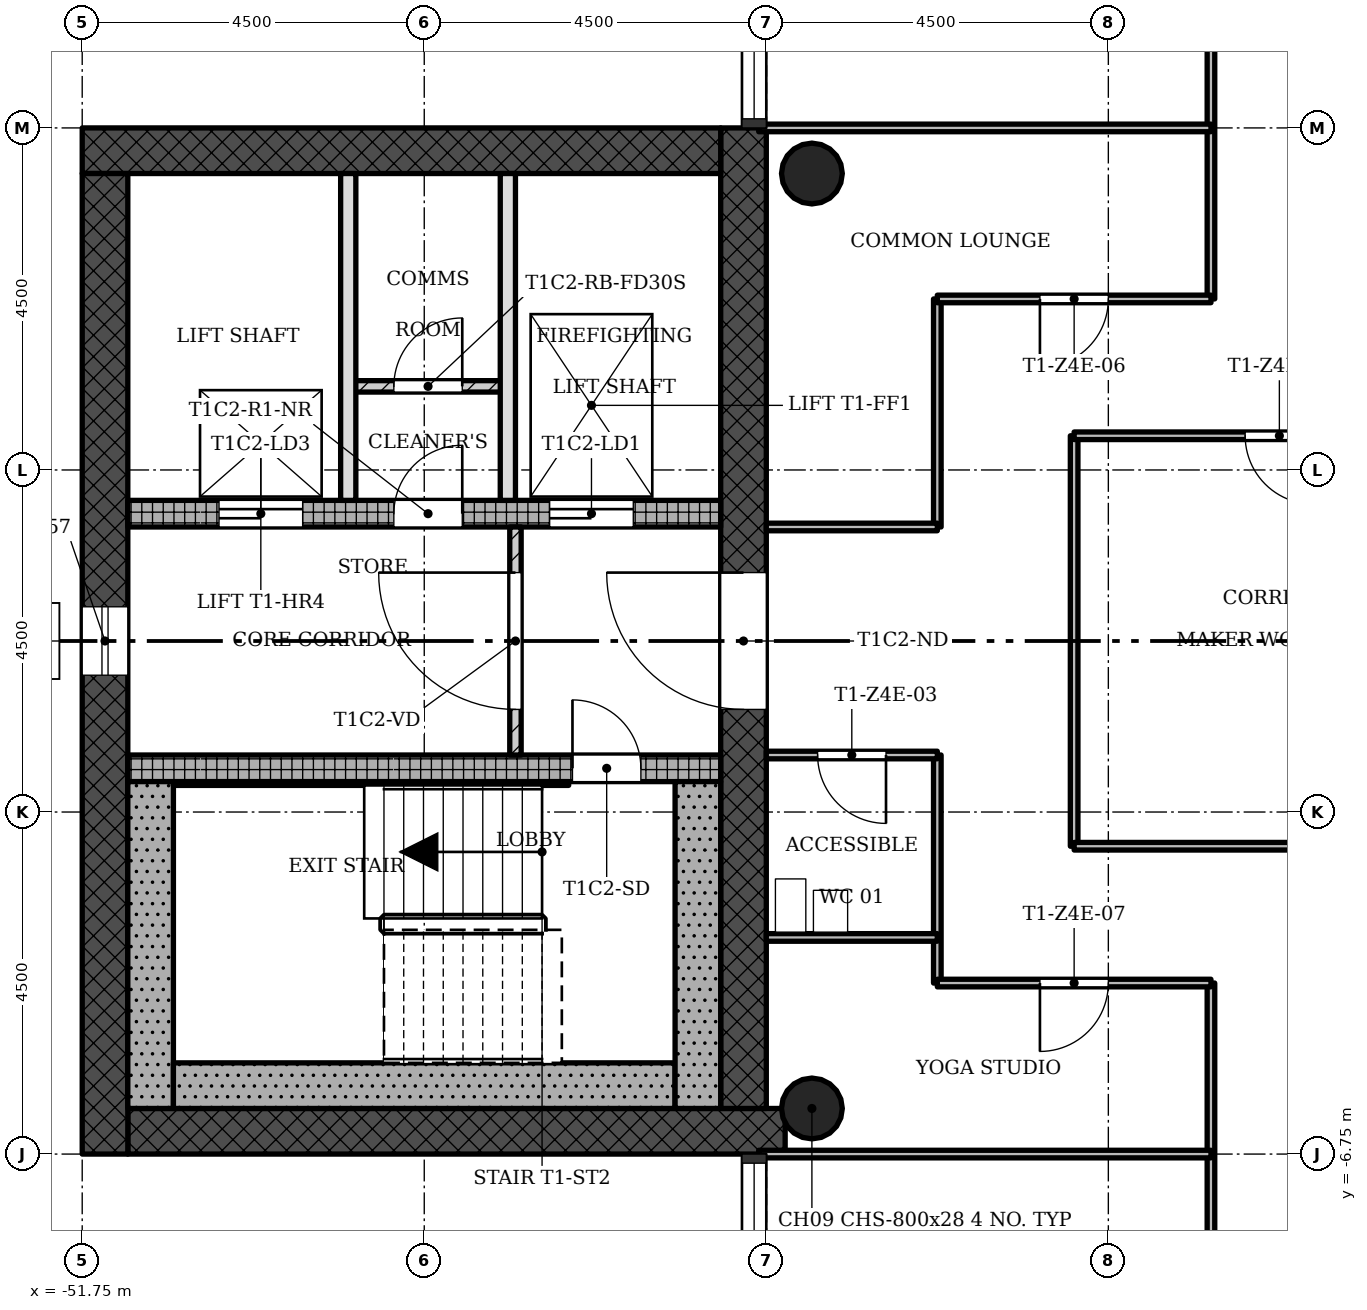
"""IFC4 building model, lengths in metres.
Left out: names, types, materials, properties, quantities, classifications, styles, units other than length and angle.
Written with IfcOpenShell. Run it as: python <this file> out.ifc"""

import sys

from ifc_helpers import new_model, si_unit, direction, frame, frame_2d, origin, origin_2d, place, context, subcontext, project, spatial, rectangle, hollow_circle, extrude, element, fill, save


model = new_model("IFC4")
c1 = context("Model", 3, precision=1e-05, world=origin(), true_north=direction((0.0, 1.0)))
c2 = subcontext(c1, "Body", "Model", "MODEL_VIEW")
j1 = project(units=[si_unit("LENGTHUNIT", "METRE"), si_unit("PLANEANGLEUNIT", "RADIAN")], contexts=[c1])
p1 = place(None, origin())
s1 = spatial("IfcSite", under=j1, at=p1, CompositionType="ELEMENT")
p2 = place(p1, origin())
s2 = spatial("IfcBuilding", under=s1, at=p2, CompositionType="ELEMENT")
p3 = place(p2, frame((0.0, 0.0, 206.2)))
s3 = spatial("IfcBuildingStorey", under=s2, at=p3, CompositionType="ELEMENT", Elevation=206.2)
p4 = place(p3, frame((-51.15, -6.45, 0.0), z_axis=(0.0, 0.0, 1.0), x_axis=(1.0, 0.0, 0.0)))
e1 = element("IfcWall", 1, at=p4, inside=s3, PredefinedType="SHEAR", context=c2, shape_type="SweptSolid", body=[
    extrude(rectangle(XDim=8.648, YDim=0.6, at=frame_2d((4.324, 0.0))), origin(), (0.0, 0.0, 1.0), 3.4),
])
p5 = place(p3, frame((-43.05, -6.15, 0.0), z_axis=(0.0, 0.0, 1.0), x_axis=(0.0, 1.0, 0.0)))
e2 = element("IfcWall", 2, at=p5, inside=s3, PredefinedType="SHEAR", context=c2, shape_type="SweptSolid", body=[
    extrude(rectangle(XDim=12.9, YDim=0.6, at=frame_2d((6.45, 0.0))), origin(), (0.0, 0.0, 1.0), 3.4),
])
p6 = place(p5, frame((5.25, 0.0, 0.0)))
e3 = element("IfcOpeningElement", 3, at=p6, cuts=e2, PredefinedType="OPENING", context=c2, shape_type="SweptSolid", body=[
    extrude(rectangle(XDim=1.8, YDim=2.1, at=frame_2d((0.9, 1.05))), frame((0.0, 0.31, 0.0), z_axis=(0.0, -1.0, 0.0), x_axis=(1.0, 0.0, 0.0)), (0.0, 0.0, 1.0), 0.62),
])
p7 = place(p3, frame((-43.35, 6.45, 0.0), z_axis=(0.0, 0.0, 1.0), x_axis=(-1.0, 0.0, 0.0)))
e4 = element("IfcWall", 4, at=p7, inside=s3, PredefinedType="SHEAR", context=c2, shape_type="SweptSolid", body=[
    extrude(rectangle(XDim=8.4, YDim=0.6, at=frame_2d((4.2, 0.0))), origin(), (0.0, 0.0, 1.0), 3.4),
])
p8 = place(p3, frame((-51.45, 6.15, 0.0), z_axis=(0.0, 0.0, 1.0), x_axis=(0.0, -1.0, 0.0)))
e5 = element("IfcWall", 5, at=p8, inside=s3, PredefinedType="SHEAR", context=c2, shape_type="SweptSolid", body=[
    extrude(rectangle(XDim=12.9, YDim=0.6, at=frame_2d((6.45, 0.0))), origin(), (0.0, 0.0, 1.0), 3.4),
])
p9 = place(p8, frame((5.7, 0.0, 0.45)))
e6 = element("IfcOpeningElement", 6, at=p9, cuts=e5, PredefinedType="OPENING", context=c2, shape_type="SweptSolid", body=[
    extrude(rectangle(XDim=0.9, YDim=2.4, at=frame_2d((0.45, 1.2))), frame((0.0, 0.31, 0.0), z_axis=(0.0, -1.0, 0.0), x_axis=(1.0, 0.0, 0.0)), (0.0, 0.0, 1.0), 0.62),
])
p10 = place(p3, frame((-51.15, -1.675, 0.0), z_axis=(0.0, 0.0, 1.0), x_axis=(1.0, 0.0, 0.0)))
e7 = element("IfcWall", 7, at=p10, inside=s3, PredefinedType="SHEAR", context=c2, shape_type="SweptSolid", body=[
    extrude(rectangle(XDim=7.8, YDim=0.35, at=frame_2d((3.9, 0.0))), origin(), (0.0, 0.0, 1.0), 3.4),
])
p11 = place(p10, frame((5.85, 0.0, 0.0)))
e8 = element("IfcOpeningElement", 8, at=p11, cuts=e7, PredefinedType="OPENING", context=c2, shape_type="SweptSolid", body=[
    extrude(rectangle(XDim=0.9, YDim=2.1, at=frame_2d((0.45, 1.05))), frame((0.0, 0.185, 0.0), z_axis=(0.0, -1.0, 0.0), x_axis=(1.0, 0.0, 0.0)), (0.0, 0.0, 1.0), 0.37),
])
p12 = place(p3, frame((-51.15, 1.675, 0.0), z_axis=(0.0, 0.0, 1.0), x_axis=(1.0, 0.0, 0.0)))
e9 = element("IfcWall", 9, at=p12, inside=s3, PredefinedType="SHEAR", context=c2, shape_type="SweptSolid", body=[
    extrude(rectangle(XDim=7.8, YDim=0.35, at=frame_2d((3.9, 0.0))), origin(), (0.0, 0.0, 1.0), 3.4),
])
p13 = place(p12, frame((5.55, 0.0, 0.0)))
e10 = element("IfcOpeningElement", 10, at=p13, cuts=e9, PredefinedType="OPENING", context=c2, shape_type="SweptSolid", body=[
    extrude(rectangle(XDim=1.1, YDim=2.1, at=frame_2d((0.55, 1.05))), frame((0.0, 0.185, 0.0), z_axis=(0.0, -1.0, 0.0), x_axis=(1.0, 0.0, 0.0)), (0.0, 0.0, 1.0), 0.37),
])
p14 = place(p12, frame((1.2, 0.0, 0.0)))
e11 = element("IfcOpeningElement", 11, at=p14, cuts=e9, PredefinedType="OPENING", context=c2, shape_type="SweptSolid", body=[
    extrude(rectangle(XDim=1.1, YDim=2.1, at=frame_2d((0.55, 1.05))), frame((0.0, 0.185, 0.0), z_axis=(0.0, -1.0, 0.0), x_axis=(1.0, 0.0, 0.0)), (0.0, 0.0, 1.0), 0.37),
])
p15 = place(p12, frame((3.5, 0.0, 0.0)))
e12 = element("IfcOpeningElement", 12, at=p15, cuts=e9, PredefinedType="OPENING", context=c2, shape_type="SweptSolid", body=[
    extrude(rectangle(XDim=0.9, YDim=2.1, at=frame_2d((0.45, 1.05))), frame((0.0, 0.185, 0.0), z_axis=(0.0, -1.0, 0.0), x_axis=(1.0, 0.0, 0.0)), (0.0, 0.0, 1.0), 0.37),
])
for number, where, z_axis, x_axis in (
    (13, (-42.15, -6.15, 0.0), (0.0, 0.0, 1.0), (1.0, 0.0, 0.0)),
    (14, (-42.15, 6.15, 0.0), (0.0, 0.0, 1.0), (1.0, 0.0, 0.0)),
):
    element("IfcColumn", number, at=place(p3, frame(where, z_axis=z_axis, x_axis=x_axis)), inside=s3, PredefinedType="COLUMN", context=c2, shape_type="SweptSolid", body=[
        extrude(hollow_circle(Radius=0.4, WallThickness=0.028, at=origin_2d()), origin(), (0.0, 0.0, 1.0), 3.4),
    ])
p16 = place(p3, frame((-46.05, 1.5, 0.0), z_axis=(0.0, 0.0, 1.0), x_axis=(0.0, -1.0, 0.0)))
e15 = element("IfcWall", 15, at=p16, inside=s3, PredefinedType="PARTITIONING", context=c2, shape_type="SweptSolid", body=[
    extrude(rectangle(XDim=3.0, YDim=0.15, at=frame_2d((1.5, 0.0))), origin(), (0.0, 0.0, 1.0), 3.0),
])
p17 = place(p16, frame((0.6, 0.0, 0.0)))
e16 = element("IfcOpeningElement", 16, at=p17, cuts=e15, PredefinedType="OPENING", context=c2, shape_type="SweptSolid", body=[
    extrude(rectangle(XDim=1.8, YDim=2.1, at=frame_2d((0.9, 1.05))), frame((0.0, 0.085, 0.0), z_axis=(0.0, -1.0, 0.0), x_axis=(1.0, 0.0, 0.0)), (0.0, 0.0, 1.0), 0.17),
])
for number, where, z_axis, x_axis in (
    (17, (-48.25, 6.15, 0.0), (0.0, 0.0, 1.0), (0.0, -1.0, 0.0)),
    (18, (-46.15, 6.15, 0.0), (0.0, 0.0, 1.0), (0.0, -1.0, 0.0)),
):
    element("IfcWall", number, at=place(p3, frame(where, z_axis=z_axis, x_axis=x_axis)), inside=s3, PredefinedType="SOLIDWALL", context=c2, shape_type="SweptSolid", body=[
        extrude(rectangle(XDim=4.3, YDim=0.2, at=frame_2d((2.15, 0.0))), origin(), (0.0, 0.0, 1.0), 3.0),
    ])
p18 = place(p3, frame((-46.15, 3.35, 0.0), z_axis=(0.0, 0.0, 1.0), x_axis=(-1.0, 0.0, 0.0)))
e19 = element("IfcWall", 19, at=p18, inside=s3, PredefinedType="PARTITIONING", context=c2, shape_type="SweptSolid", body=[
    extrude(rectangle(XDim=2.1, YDim=0.15, at=frame_2d((1.05, 0.0))), origin(), (0.0, 0.0, 1.0), 3.0),
])
p19 = place(p18, frame((0.6, 0.0, 0.0)))
e20 = element("IfcOpeningElement", 20, at=p19, cuts=e19, PredefinedType="OPENING", context=c2, shape_type="SweptSolid", body=[
    extrude(rectangle(XDim=0.9, YDim=2.1, at=frame_2d((0.45, 1.05))), frame((0.0, 0.085, 0.0), z_axis=(0.0, -1.0, 0.0), x_axis=(1.0, 0.0, 0.0)), (0.0, 0.0, 1.0), 0.17),
])
for number, where, z_axis, x_axis in (
    (21, (-40.5, -4.5, 0.0), (0.0, 0.0, 1.0), (0.0, 1.0, 0.0)),
    (22, (-40.5, 1.5, 0.0), (0.0, 0.0, 1.0), (0.0, 1.0, 0.0)),
):
    element("IfcWall", number, at=place(p3, frame(where, z_axis=z_axis, x_axis=x_axis)), inside=s3, PredefinedType="PARTITIONING", context=c2, shape_type="SweptSolid", body=[
        extrude(rectangle(XDim=3.0, YDim=0.1, at=frame_2d((1.5, 0.0))), origin(), (0.0, 0.0, 1.0), 3.0),
    ])
p20 = place(p3, frame((-38.7, -2.7, 0.0), z_axis=(0.0, 0.0, 1.0), x_axis=(0.0, 1.0, 0.0)))
e23 = element("IfcWall", 23, at=p20, inside=s3, PredefinedType="PARTITIONING", context=c2, shape_type="SweptSolid", body=[
    extrude(rectangle(XDim=5.4, YDim=0.1, at=frame_2d((2.7, 0.0))), origin(), (0.0, 0.0, 1.0), 3.0),
])
p21 = place(p3, frame((-36.9, -8.55, 0.0), z_axis=(0.0, 0.0, 1.0), x_axis=(0.0, 1.0, 0.0)))
e24 = element("IfcWall", 24, at=p21, inside=s3, PredefinedType="PARTITIONING", context=c2, shape_type="SweptSolid", body=[
    extrude(rectangle(XDim=4.05, YDim=0.1, at=frame_2d((2.025, 0.0))), origin(), (0.0, 0.0, 1.0), 3.0),
])
p22 = place(p3, frame((-36.9, 4.5, 0.0), z_axis=(0.0, 0.0, 1.0), x_axis=(0.0, 1.0, 0.0)))
e25 = element("IfcWall", 25, at=p22, inside=s3, PredefinedType="PARTITIONING", context=c2, shape_type="SweptSolid", body=[
    extrude(rectangle(XDim=6.75, YDim=0.1, at=frame_2d((3.375, 0.0))), origin(), (0.0, 0.0, 1.0), 3.0),
])
p23 = place(p22, frame((4.05, 0.0, 0.0)))
e26 = element("IfcOpeningElement", 26, at=p23, cuts=e25, PredefinedType="OPENING", context=c2, shape_type="SweptSolid", body=[
    extrude(rectangle(XDim=0.9, YDim=2.1, at=frame_2d((0.45, 1.05))), frame((0.0, 0.06, 0.0), z_axis=(0.0, -1.0, 0.0), x_axis=(1.0, 0.0, 0.0)), (0.0, 0.0, 1.0), 0.12),
])
p24 = place(p3, frame((-42.85, -6.75, 0.0), z_axis=(0.0, 0.0, 1.0), x_axis=(1.0, 0.0, 0.0)))
e27 = element("IfcWall", 27, at=p24, inside=s3, PredefinedType="PARTITIONING", context=c2, shape_type="SweptSolid", body=[
    extrude(rectangle(XDim=5.95, YDim=0.1, at=frame_2d((2.975, 0.0))), origin(), (0.0, 0.0, 1.0), 3.0),
])
p25 = place(p3, frame((-40.5, -4.5, 0.0), z_axis=(0.0, 0.0, 1.0), x_axis=(1.0, 0.0, 0.0)))
e28 = element("IfcWall", 28, at=p25, inside=s3, PredefinedType="PARTITIONING", context=c2, shape_type="SweptSolid", body=[
    extrude(rectangle(XDim=3.6, YDim=0.1, at=frame_2d((1.8, 0.0))), origin(), (0.0, 0.0, 1.0), 3.0),
])
p26 = place(p25, frame((1.35, 0.0, 0.0)))
e29 = element("IfcOpeningElement", 29, at=p26, cuts=e28, PredefinedType="OPENING", context=c2, shape_type="SweptSolid", body=[
    extrude(rectangle(XDim=0.9, YDim=2.1, at=frame_2d((0.45, 1.05))), frame((0.0, 0.06, 0.0), z_axis=(0.0, -1.0, 0.0), x_axis=(1.0, 0.0, 0.0)), (0.0, 0.0, 1.0), 0.12),
])
p27 = place(p3, frame((-42.75, -3.9, 0.0), z_axis=(0.0, 0.0, 1.0), x_axis=(1.0, 0.0, 0.0)))
e30 = element("IfcWall", 30, at=p27, inside=s3, PredefinedType="PARTITIONING", context=c2, shape_type="SweptSolid", body=[
    extrude(rectangle(XDim=2.25, YDim=0.1, at=frame_2d((1.125, 0.0))), origin(), (0.0, 0.0, 1.0), 3.0),
])
p28 = place(p3, frame((-38.7, -2.7, 0.0), z_axis=(0.0, 0.0, 1.0), x_axis=(1.0, 0.0, 0.0)))
e31 = element("IfcWall", 31, at=p28, inside=s3, PredefinedType="PARTITIONING", context=c2, shape_type="SweptSolid", body=[
    extrude(rectangle(XDim=5.4, YDim=0.1, at=frame_2d((2.7, 0.0))), origin(), (0.0, 0.0, 1.0), 3.0),
])
p29 = place(p3, frame((-42.75, -1.5, 0.0), z_axis=(0.0, 0.0, 1.0), x_axis=(1.0, 0.0, 0.0)))
e32 = element("IfcWall", 32, at=p29, inside=s3, PredefinedType="PARTITIONING", context=c2, shape_type="SweptSolid", body=[
    extrude(rectangle(XDim=2.25, YDim=0.1, at=frame_2d((1.125, 0.0))), origin(), (0.0, 0.0, 1.0), 3.0),
])
p30 = place(p29, frame((0.675, 0.0, 0.0)))
e33 = element("IfcOpeningElement", 33, at=p30, cuts=e32, PredefinedType="OPENING", context=c2, shape_type="SweptSolid", body=[
    extrude(rectangle(XDim=0.9, YDim=2.1, at=frame_2d((0.45, 1.05))), frame((0.0, 0.06, 0.0), z_axis=(0.0, -1.0, 0.0), x_axis=(1.0, 0.0, 0.0)), (0.0, 0.0, 1.0), 0.12),
])
p31 = place(p3, frame((-42.75, 1.5, 0.0), z_axis=(0.0, 0.0, 1.0), x_axis=(1.0, 0.0, 0.0)))
e34 = element("IfcWall", 34, at=p31, inside=s3, PredefinedType="PARTITIONING", context=c2, shape_type="SweptSolid", body=[
    extrude(rectangle(XDim=2.25, YDim=0.1, at=frame_2d((1.125, 0.0))), origin(), (0.0, 0.0, 1.0), 3.0),
])
p32 = place(p3, frame((-38.7, 2.7, 0.0), z_axis=(0.0, 0.0, 1.0), x_axis=(1.0, 0.0, 0.0)))
e35 = element("IfcWall", 35, at=p32, inside=s3, PredefinedType="PARTITIONING", context=c2, shape_type="SweptSolid", body=[
    extrude(rectangle(XDim=5.4, YDim=0.1, at=frame_2d((2.7, 0.0))), origin(), (0.0, 0.0, 1.0), 3.0),
])
p33 = place(p32, frame((2.25, 0.0, 0.0)))
e36 = element("IfcOpeningElement", 36, at=p33, cuts=e35, PredefinedType="OPENING", context=c2, shape_type="SweptSolid", body=[
    extrude(rectangle(XDim=0.9, YDim=2.1, at=frame_2d((0.45, 1.05))), frame((0.0, 0.06, 0.0), z_axis=(0.0, -1.0, 0.0), x_axis=(1.0, 0.0, 0.0)), (0.0, 0.0, 1.0), 0.12),
])
p34 = place(p3, frame((-40.5, 4.5, 0.0), z_axis=(0.0, 0.0, 1.0), x_axis=(1.0, 0.0, 0.0)))
e37 = element("IfcWall", 37, at=p34, inside=s3, PredefinedType="PARTITIONING", context=c2, shape_type="SweptSolid", body=[
    extrude(rectangle(XDim=3.6, YDim=0.1, at=frame_2d((1.8, 0.0))), origin(), (0.0, 0.0, 1.0), 3.0),
])
p35 = place(p34, frame((1.35, 0.0, 0.0)))
e38 = element("IfcOpeningElement", 38, at=p35, cuts=e37, PredefinedType="OPENING", context=c2, shape_type="SweptSolid", body=[
    extrude(rectangle(XDim=0.9, YDim=2.1, at=frame_2d((0.45, 1.05))), frame((0.0, 0.06, 0.0), z_axis=(0.0, -1.0, 0.0), x_axis=(1.0, 0.0, 0.0)), (0.0, 0.0, 1.0), 0.12),
])
p36 = place(p3, frame((-42.85, 6.75, 0.0), z_axis=(0.0, 0.0, 1.0), x_axis=(1.0, 0.0, 0.0)))
e39 = element("IfcWall", 39, at=p36, inside=s3, PredefinedType="PARTITIONING", context=c2, shape_type="SweptSolid", body=[
    extrude(rectangle(XDim=5.95, YDim=0.1, at=frame_2d((2.975, 0.0))), origin(), (0.0, 0.0, 1.0), 3.0),
])
p37 = place(p3, frame((-50.85, -1.85, 0.0), z_axis=(0.0, 0.0, 1.0), x_axis=(0.0, -1.0, 0.0)))
e40 = element("IfcWall", 40, at=p37, inside=s3, PredefinedType="SHEAR", context=c2, shape_type="SweptSolid", body=[
    extrude(rectangle(XDim=4.3, YDim=0.6, at=frame_2d((2.15, 0.0))), origin(), (0.0, 0.0, 1.0), 3.4),
])
p38 = place(p3, frame((-43.95, -5.85, 0.0), z_axis=(0.0, 0.0, 1.0), x_axis=(-1.0, 0.0, 0.0)))
e41 = element("IfcWall", 41, at=p38, inside=s3, PredefinedType="SHEAR", context=c2, shape_type="SweptSolid", body=[
    extrude(rectangle(XDim=6.6, YDim=0.6, at=frame_2d((3.3, 0.0))), origin(), (0.0, 0.0, 1.0), 3.4),
])
p39 = place(p3, frame((-43.65, -1.85, 0.0), z_axis=(0.0, 0.0, 1.0), x_axis=(0.0, -1.0, 0.0)))
e42 = element("IfcWall", 42, at=p39, inside=s3, PredefinedType="SHEAR", context=c2, shape_type="SweptSolid", body=[
    extrude(rectangle(XDim=4.3, YDim=0.6, at=frame_2d((2.15, 0.0))), origin(), (0.0, 0.0, 1.0), 3.4),
])
p40 = place(p3, frame((-45.35, -1.875, 0.0), z_axis=(0.0, 0.0, 1.0), x_axis=(-1.0, 0.0, 0.0)))
e43 = element("IfcWall", 43, at=p40, inside=s3, PredefinedType="SHEAR", context=c2, shape_type="SweptSolid", body=[
    extrude(rectangle(XDim=5.2, YDim=0.05, at=frame_2d((2.6, 0.0))), origin(), (0.0, 0.0, 1.0), 3.4),
])
p41 = place(p9, origin())
e44 = element("IfcWindow", 44, at=p41, inside=s3, PartitioningType="SINGLE_PANEL", PredefinedType="WINDOW", context=c2, shape_type="SweptSolid", body=[
    extrude(rectangle(XDim=0.9, YDim=2.4, at=frame_2d((0.45, 1.2))), frame((0.0, 0.03, 0.0), z_axis=(0.0, -1.0, 0.0), x_axis=(1.0, 0.0, 0.0)), (0.0, 0.0, 1.0), 0.06),
])
fill(e6, e44)
p42 = place(p17, origin())
e45 = element("IfcDoor", 45, at=p42, inside=s3, OperationType="SINGLE_SWING_LEFT", PredefinedType="DOOR", context=c2, shape_type="SweptSolid", body=[
    extrude(rectangle(XDim=1.8, YDim=2.1, at=frame_2d((0.9, 1.05))), frame((0.0, 0.025, 0.0), z_axis=(0.0, -1.0, 0.0), x_axis=(1.0, 0.0, 0.0)), (0.0, 0.0, 1.0), 0.05),
])
fill(e16, e45)
p43 = place(p19, origin())
e46 = element("IfcDoor", 46, at=p43, inside=s3, OperationType="SINGLE_SWING_LEFT", PredefinedType="DOOR", context=c2, shape_type="SweptSolid", body=[
    extrude(rectangle(XDim=0.9, YDim=2.1, at=frame_2d((0.45, 1.05))), frame((0.0, 0.025, 0.0), z_axis=(0.0, -1.0, 0.0), x_axis=(1.0, 0.0, 0.0)), (0.0, 0.0, 1.0), 0.05),
])
fill(e20, e46)
p44 = place(p33, origin())
e47 = element("IfcDoor", 47, at=p44, inside=s3, OperationType="SINGLE_SWING_RIGHT", PredefinedType="DOOR", context=c2, shape_type="SweptSolid", body=[
    extrude(rectangle(XDim=0.9, YDim=2.1, at=frame_2d((0.45, 1.05))), frame((0.0, 0.025, 0.0), z_axis=(0.0, -1.0, 0.0), x_axis=(1.0, 0.0, 0.0)), (0.0, 0.0, 1.0), 0.05),
])
fill(e36, e47)
p45 = place(p30, origin())
e48 = element("IfcDoor", 48, at=p45, inside=s3, OperationType="SINGLE_SWING_RIGHT", PredefinedType="DOOR", context=c2, shape_type="SweptSolid", body=[
    extrude(rectangle(XDim=0.9, YDim=2.1, at=frame_2d((0.45, 1.05))), frame((0.0, 0.025, 0.0), z_axis=(0.0, -1.0, 0.0), x_axis=(1.0, 0.0, 0.0)), (0.0, 0.0, 1.0), 0.05),
])
fill(e33, e48)
p46 = place(p35, origin())
e49 = element("IfcDoor", 49, at=p46, inside=s3, OperationType="SINGLE_SWING_LEFT", PredefinedType="DOOR", context=c2, shape_type="SweptSolid", body=[
    extrude(rectangle(XDim=0.9, YDim=2.1, at=frame_2d((0.45, 1.05))), frame((0.0, 0.025, 0.0), z_axis=(0.0, -1.0, 0.0), x_axis=(1.0, 0.0, 0.0)), (0.0, 0.0, 1.0), 0.05),
])
fill(e38, e49)
p47 = place(p26, origin())
e50 = element("IfcDoor", 50, at=p47, inside=s3, OperationType="SINGLE_SWING_LEFT", PredefinedType="DOOR", context=c2, shape_type="SweptSolid", body=[
    extrude(rectangle(XDim=0.9, YDim=2.1, at=frame_2d((0.45, 1.05))), frame((0.0, 0.025, 0.0), z_axis=(0.0, -1.0, 0.0), x_axis=(1.0, 0.0, 0.0)), (0.0, 0.0, 1.0), 0.05),
])
fill(e29, e50)
p48 = place(p11, origin())
e51 = element("IfcDoor", 51, at=p48, inside=s3, OperationType="SINGLE_SWING_RIGHT", PredefinedType="DOOR", context=c2, shape_type="SweptSolid", body=[
    extrude(rectangle(XDim=0.9, YDim=2.1, at=frame_2d((0.45, 1.05))), frame((0.0, 0.025, 0.0), z_axis=(0.0, -1.0, 0.0), x_axis=(1.0, 0.0, 0.0)), (0.0, 0.0, 1.0), 0.05),
])
fill(e8, e51)
p49 = place(p13, origin())
e52 = element("IfcDoor", 52, at=p49, inside=s3, OperationType="SLIDING_TO_LEFT", PredefinedType="DOOR", context=c2, shape_type="SweptSolid", body=[
    extrude(rectangle(XDim=1.1, YDim=2.1, at=frame_2d((0.55, 1.05))), frame((0.0, 0.025, 0.0), z_axis=(0.0, -1.0, 0.0), x_axis=(1.0, 0.0, 0.0)), (0.0, 0.0, 1.0), 0.05),
])
fill(e10, e52)
p50 = place(p14, origin())
e53 = element("IfcDoor", 53, at=p50, inside=s3, OperationType="SLIDING_TO_LEFT", PredefinedType="DOOR", context=c2, shape_type="SweptSolid", body=[
    extrude(rectangle(XDim=1.1, YDim=2.1, at=frame_2d((0.55, 1.05))), frame((0.0, 0.025, 0.0), z_axis=(0.0, -1.0, 0.0), x_axis=(1.0, 0.0, 0.0)), (0.0, 0.0, 1.0), 0.05),
])
fill(e11, e53)
p51 = place(p15, origin())
e54 = element("IfcDoor", 54, at=p51, inside=s3, OperationType="SINGLE_SWING_LEFT", PredefinedType="DOOR", context=c2, shape_type="SweptSolid", body=[
    extrude(rectangle(XDim=0.9, YDim=2.1, at=frame_2d((0.45, 1.05))), frame((0.0, 0.025, 0.0), z_axis=(0.0, -1.0, 0.0), x_axis=(1.0, 0.0, 0.0)), (0.0, 0.0, 1.0), 0.05),
])
fill(e12, e54)
p52 = place(p6, origin())
e55 = element("IfcDoor", 55, at=p52, inside=s3, OperationType="SINGLE_SWING_LEFT", PredefinedType="DOOR", context=c2, shape_type="SweptSolid", body=[
    extrude(rectangle(XDim=1.8, YDim=2.1, at=frame_2d((0.9, 1.05))), frame((0.0, 0.025, 0.0), z_axis=(0.0, -1.0, 0.0), x_axis=(1.0, 0.0, 0.0)), (0.0, 0.0, 1.0), 0.05),
])
fill(e3, e55)
save(model, sys.argv[1])
